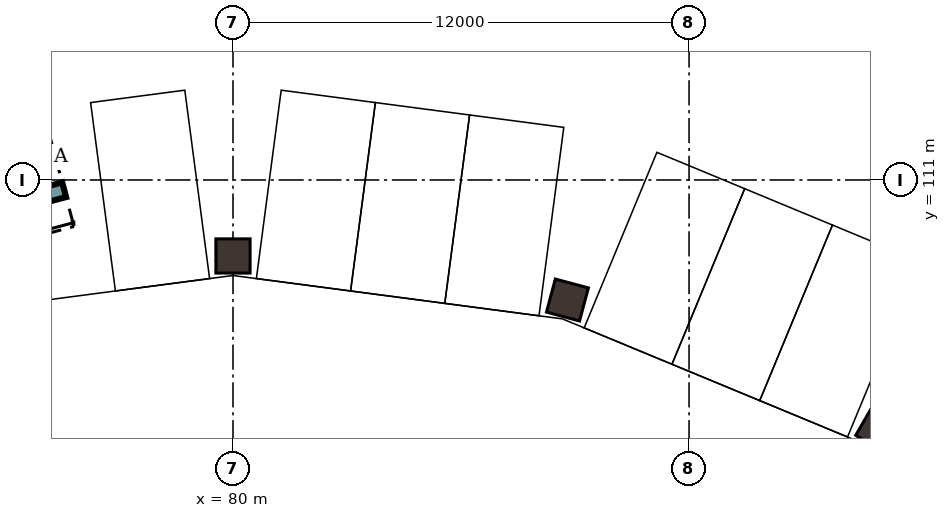
"""IFC4 building model, lengths in metres.
Left out: names, types, materials, properties, quantities, classifications, styles, units other than length and angle.
Written with IfcOpenShell. Run it as: python <this file> out.ifc"""

import sys

from ifc_helpers import new_model, si_unit, direction, frame, frame_2d, origin, origin_2d, place, context, subcontext, project, spatial, rectangle, extrude, element, save


model = new_model("IFC4")
c1 = context("Model", 3, precision=1e-05, world=origin(), true_north=direction((0.0, 1.0)))
c2 = subcontext(c1, "Body", "Model", "MODEL_VIEW")
j1 = project(units=[si_unit("LENGTHUNIT", "METRE"), si_unit("PLANEANGLEUNIT", "RADIAN")], contexts=[c1])
p1 = place(None, origin())
s1 = spatial("IfcSite", under=j1, at=p1, CompositionType="ELEMENT")
p2 = place(p1, origin())
s2 = spatial("IfcBuilding", under=s1, at=p2, CompositionType="ELEMENT")
p3 = place(p2, frame((0.0, 0.0, -9.0)))
s3 = spatial("IfcBuildingStorey", under=s2, at=p3, CompositionType="ELEMENT", Elevation=-9.0)
for number, where, z_axis, x_axis in (
    (1, (97.0, 104.445, 0.0), (0.0, 0.0, 1.0), (0.5, 0.866, 0.0)),
    (2, (88.8, 107.842, 0.0), (0.0, 0.0, 1.0), (0.259, 0.966, 0.0)),
    (3, (80.0, 109.0, 0.0), (0.0, 0.0, 1.0), (0.0, 1.0, 0.0)),
):
    element("IfcColumn", number, at=place(p3, frame(where, z_axis=z_axis, x_axis=x_axis)), inside=s3, PredefinedType="COLUMN", context=c2, shape_type="SweptSolid", body=[
        extrude(rectangle(XDim=0.9, YDim=0.9, at=origin_2d()), origin(), (0.0, 0.0, 1.0), 4.5),
    ])
p4 = place(p3, frame((75.558, 110.743, 0.0), z_axis=(0.0, 0.0, 1.0), x_axis=(-0.965908554551, -0.258883495505, 0.0)))
e4 = element("IfcWall", 4, at=p4, inside=s3, PredefinedType="STANDARD", context=c2, shape_type="SweptSolid", body=[
    extrude(rectangle(XDim=1.904, YDim=0.4, at=frame_2d((0.952, 0.0))), origin(), (0.0, 0.0, 1.0), 4.144),
])
p5 = place(p3, frame((101.904, 112.874, 0.0), z_axis=(0.0, 0.0, 1.0), x_axis=(-0.923881085843, 0.382679682269, 0.0)))
e5 = element("IfcWall", 5, at=p5, inside=s3, PredefinedType="STANDARD", context=c2, shape_type="SweptSolid", body=[
    extrude(rectangle(XDim=11.486, YDim=0.5, at=frame_2d((5.743, 0.0))), origin(), (0.0, 0.0, 1.0), 4.5),
])
save(model, sys.argv[1])
